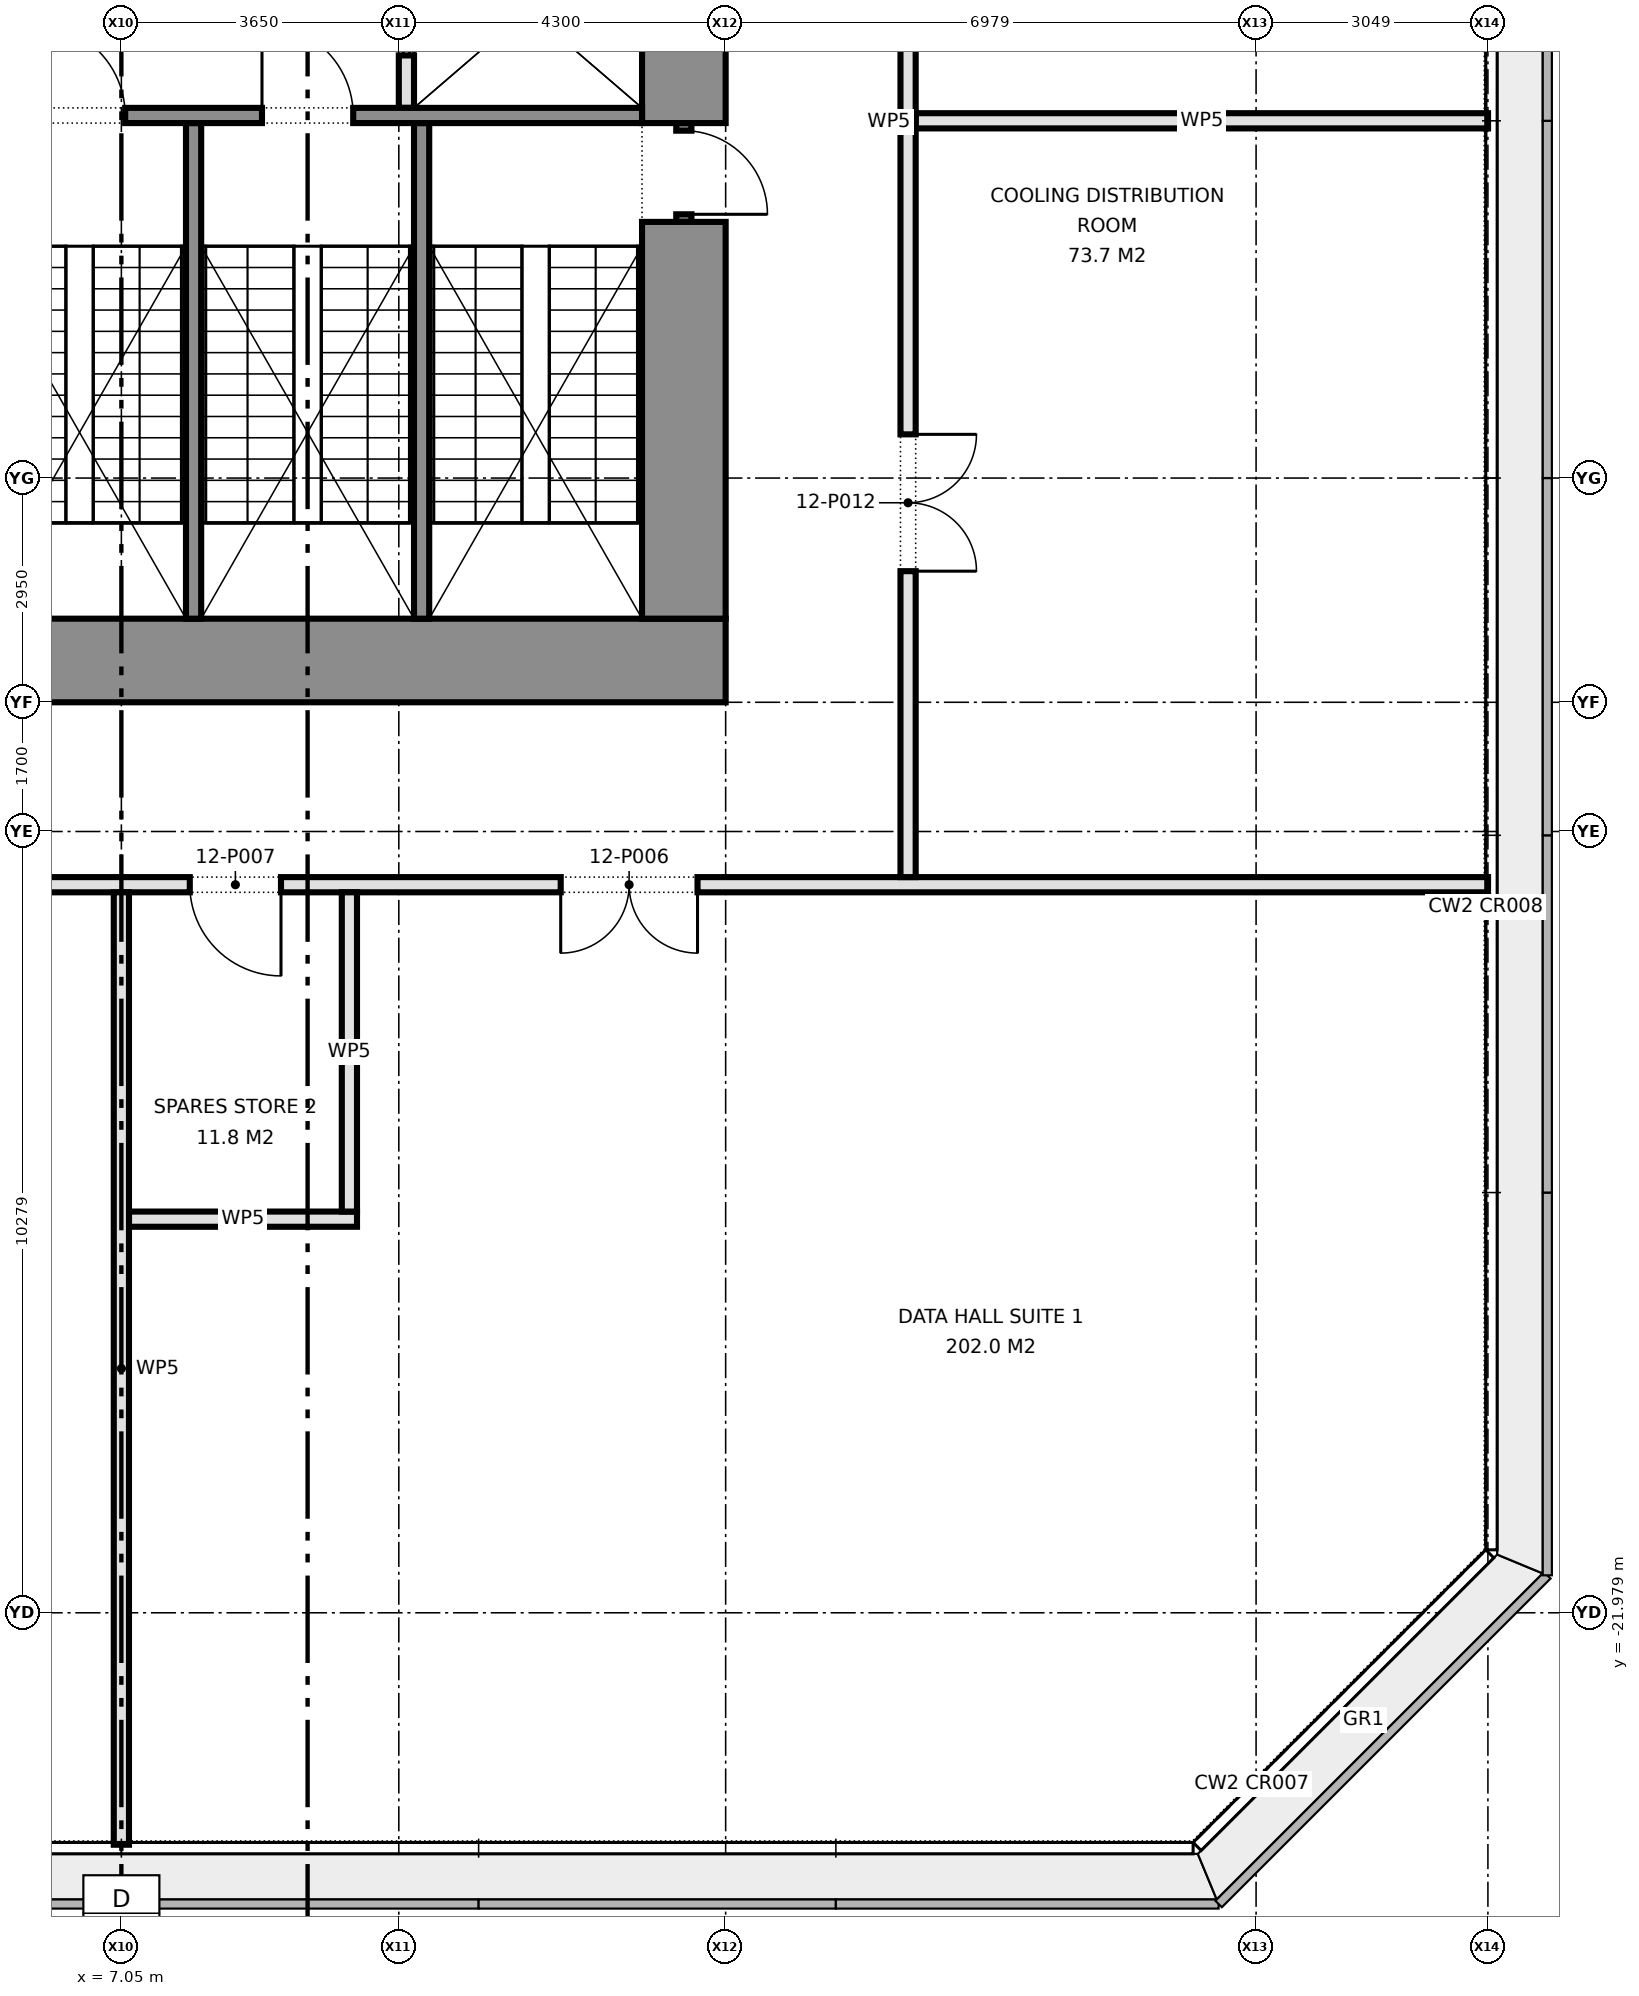
"""IFC4 building model, lengths in metres.
Left out: names, types, materials, properties, quantities, classifications, styles, units other than length and angle.
Written with IfcOpenShell. Run it as: python <this file> out.ifc"""

import sys

from ifc_helpers import new_model, si_unit, direction, frame, frame_2d, origin, place, context, subcontext, project, spatial, rectangle, extrude, element, fill, save


model = new_model("IFC4")
c1 = context("Model", 3, precision=1e-05, world=origin(), true_north=direction((0.0, 1.0)))
c2 = subcontext(c1, "Body", "Model", "MODEL_VIEW")
j1 = project(units=[si_unit("LENGTHUNIT", "METRE"), si_unit("PLANEANGLEUNIT", "RADIAN")], contexts=[c1])
p1 = place(None, origin())
s1 = spatial("IfcSite", under=j1, at=p1, CompositionType="ELEMENT")
p2 = place(p1, origin())
s2 = spatial("IfcBuilding", under=s1, at=p2, CompositionType="ELEMENT")
p3 = place(p2, frame((0.0, 0.0, 54.5)))
s3 = spatial("IfcBuildingStorey", under=s2, at=p3, CompositionType="ELEMENT", Elevation=54.5)
p4 = place(p3, frame((15.0, -9.45, 0.0), z_axis=(0.0, 0.0, 1.0), x_axis=(-1.0, 0.0, 0.0)))
e1 = element("IfcWall", 1, at=p4, inside=s3, PredefinedType="SHEAR", context=c2, shape_type="SweptSolid", body=[
    extrude(rectangle(XDim=11.0, YDim=1.1, at=frame_2d((5.5, 0.0))), origin(), (0.0, 0.0, 1.0), 4.575),
])
p5 = place(p3, frame((14.45, 3.75, 0.0), z_axis=(0.0, 0.0, 1.0), x_axis=(0.0, -1.0, 0.0)))
e2 = element("IfcWall", 2, at=p5, inside=s3, PredefinedType="SHEAR", context=c2, shape_type="SweptSolid", body=[
    extrude(rectangle(XDim=6.13, YDim=1.1, at=frame_2d((3.065, 0.0))), origin(), (0.0, 0.0, 1.0), 4.575),
])
p6 = place(p3, frame((14.45, -2.38, 0.0), z_axis=(0.0, 0.0, 1.0), x_axis=(0.0, -1.0, 0.0)))
e3 = element("IfcWall", 3, at=p6, inside=s3, PredefinedType="SHEAR", context=c2, shape_type="SweptSolid", body=[
    extrude(rectangle(XDim=1.3, YDim=0.2, at=frame_2d((0.65, 0.0))), origin(), (0.0, 0.0, 1.0), 2.4),
])
p7 = place(p6, frame((0.1, 0.0, 0.0)))
e4 = element("IfcOpeningElement", 4, at=p7, cuts=e3, PredefinedType="OPENING", context=c2, shape_type="SweptSolid", body=[
    extrude(rectangle(XDim=1.1, YDim=2.1, at=frame_2d((0.55, 1.05))), frame((0.0, 0.11, 0.0), z_axis=(0.0, -1.0, 0.0), x_axis=(1.0, 0.0, 0.0)), (0.0, 0.0, 1.0), 0.22),
])
p8 = place(p3, frame((14.45, -3.68, 0.0), z_axis=(0.0, 0.0, 1.0), x_axis=(0.0, -1.0, 0.0)))
e5 = element("IfcWall", 5, at=p8, inside=s3, PredefinedType="SHEAR", context=c2, shape_type="SweptSolid", body=[
    extrude(rectangle(XDim=5.22, YDim=1.1, at=frame_2d((2.61, 0.0))), origin(), (0.0, 0.0, 1.0), 4.575),
])
p9 = place(p3, frame((10.8, 0.4, 0.0), z_axis=(0.0, 0.0, 1.0), x_axis=(0.0, -1.0, 0.0)))
e6 = element("IfcWall", 6, at=p9, inside=s3, PredefinedType="PARTITIONING", context=c2, shape_type="SweptSolid", body=[
    extrude(rectangle(XDim=2.58, YDim=0.2, at=frame_2d((1.29, 0.0))), origin(), (0.0, 0.0, 1.0), 4.575),
])
p10 = place(p9, frame((0.69, 0.0, 0.0)))
e7 = element("IfcOpeningElement", 7, at=p10, cuts=e6, PredefinedType="OPENING", context=c2, shape_type="SweptSolid", body=[
    extrude(rectangle(XDim=1.2, YDim=2.1, at=frame_2d((0.6, 1.05))), frame((0.0, 0.11, 0.0), z_axis=(0.0, -1.0, 0.0), x_axis=(1.0, 0.0, 0.0)), (0.0, 0.0, 1.0), 0.22),
])
p11 = place(p3, frame((13.9, -2.28, 0.0), z_axis=(0.0, 0.0, 1.0), x_axis=(-1.0, 0.0, 0.0)))
e8 = element("IfcWall", 8, at=p11, inside=s3, PredefinedType="SHEAR", context=c2, shape_type="SweptSolid", body=[
    extrude(rectangle(XDim=8.8, YDim=0.2, at=frame_2d((4.4, 0.0))), origin(), (0.0, 0.0, 1.0), 4.575),
])
p12 = place(p11, frame((3.8, 0.0, 0.0)))
e9 = element("IfcOpeningElement", 9, at=p12, cuts=e8, PredefinedType="OPENING", context=c2, shape_type="SweptSolid", body=[
    extrude(rectangle(XDim=1.2, YDim=2.1, at=frame_2d((0.6, 1.05))), frame((0.0, 0.11, 0.0), z_axis=(0.0, -1.0, 0.0), x_axis=(1.0, 0.0, 0.0)), (0.0, 0.0, 1.0), 0.22),
])
p13 = place(p11, frame((6.8, 0.0, 0.0)))
e10 = element("IfcOpeningElement", 10, at=p13, cuts=e8, PredefinedType="OPENING", context=c2, shape_type="SweptSolid", body=[
    extrude(rectangle(XDim=1.2, YDim=2.1, at=frame_2d((0.6, 1.05))), frame((0.0, 0.11, 0.0), z_axis=(0.0, -1.0, 0.0), x_axis=(1.0, 0.0, 0.0)), (0.0, 0.0, 1.0), 0.22),
])
for number, where, z_axis, x_axis in (
    (11, (11.0, -2.38, 0.0), (0.0, 0.0, 1.0), (0.0, -1.0, 0.0)),
    (12, (8.0, -2.38, 0.0), (0.0, 0.0, 1.0), (0.0, -1.0, 0.0)),
):
    element("IfcWall", number, at=place(p3, frame(where, z_axis=z_axis, x_axis=x_axis)), inside=s3, PredefinedType="SHEAR", context=c2, shape_type="SweptSolid", body=[
        extrude(rectangle(XDim=6.52, YDim=0.2, at=frame_2d((3.26, 0.0))), origin(), (0.0, 0.0, 1.0), 4.575),
    ])
p14 = place(p3, frame((7.15, -16.8, 0.0), z_axis=(0.0, 0.0, 1.0), x_axis=(1.0, 0.0, 0.0)))
e13 = element("IfcWall", 13, at=p14, inside=s3, PredefinedType="PARTITIONING", context=c2, shape_type="SweptSolid", body=[
    extrude(rectangle(XDim=3.0, YDim=0.2, at=frame_2d((1.5, 0.0))), origin(), (0.0, 0.0, 1.0), 4.575),
])
p15 = place(p3, frame((-25.03, -12.4, 0.0), z_axis=(0.0, 0.0, 1.0), x_axis=(1.0, 0.0, 0.0)))
e14 = element("IfcWall", 14, at=p15, inside=s3, PredefinedType="PARTITIONING", context=c2, shape_type="SweptSolid", body=[
    extrude(rectangle(XDim=50.06, YDim=0.2, at=frame_2d((25.03, 0.0))), origin(), (0.0, 0.0, 1.0), 4.575),
])
p16 = place(p15, frame((18.95, 0.0, 0.0)))
e15 = element("IfcOpeningElement", 15, at=p16, cuts=e14, PredefinedType="OPENING", context=c2, shape_type="SweptSolid", body=[
    extrude(rectangle(XDim=1.8, YDim=2.1, at=frame_2d((0.9, 1.05))), frame((0.0, 0.11, 0.0), z_axis=(0.0, -1.0, 0.0), x_axis=(1.0, 0.0, 0.0)), (0.0, 0.0, 1.0), 0.22),
])
p17 = place(p15, frame((37.86, 0.0, 0.0)))
e16 = element("IfcOpeningElement", 16, at=p17, cuts=e14, PredefinedType="OPENING", context=c2, shape_type="SweptSolid", body=[
    extrude(rectangle(XDim=1.8, YDim=2.1, at=frame_2d((0.9, 1.05))), frame((0.0, 0.11, 0.0), z_axis=(0.0, -1.0, 0.0), x_axis=(1.0, 0.0, 0.0)), (0.0, 0.0, 1.0), 0.22),
])
p18 = place(p15, frame((32.98, 0.0, 0.0)))
e17 = element("IfcOpeningElement", 17, at=p18, cuts=e14, PredefinedType="OPENING", context=c2, shape_type="SweptSolid", body=[
    extrude(rectangle(XDim=1.2, YDim=2.1, at=frame_2d((0.6, 1.05))), frame((0.0, 0.11, 0.0), z_axis=(0.0, -1.0, 0.0), x_axis=(1.0, 0.0, 0.0)), (0.0, 0.0, 1.0), 0.22),
])
p19 = place(p3, frame((17.5, -2.35, 0.0), z_axis=(0.0, 0.0, 1.0), x_axis=(1.0, 0.0, 0.0)))
e18 = element("IfcWall", 18, at=p19, inside=s3, PredefinedType="PARTITIONING", context=c2, shape_type="SweptSolid", body=[
    extrude(rectangle(XDim=7.53, YDim=0.2, at=frame_2d((3.765, 0.0))), origin(), (0.0, 0.0, 1.0), 4.575),
])
p20 = place(p3, frame((17.4, -12.3, 0.0), z_axis=(0.0, 0.0, 1.0), x_axis=(0.0, 1.0, 0.0)))
e19 = element("IfcWall", 19, at=p20, inside=s3, PredefinedType="PARTITIONING", context=c2, shape_type="SweptSolid", body=[
    extrude(rectangle(XDim=24.6, YDim=0.2, at=frame_2d((12.3, 0.0))), origin(), (0.0, 0.0, 1.0), 4.575),
])
p21 = place(p20, frame((4.025, 0.0, 0.0)))
e20 = element("IfcOpeningElement", 20, at=p21, cuts=e19, PredefinedType="OPENING", context=c2, shape_type="SweptSolid", body=[
    extrude(rectangle(XDim=1.8, YDim=2.1, at=frame_2d((0.9, 1.05))), frame((0.0, 0.11, 0.0), z_axis=(0.0, -1.0, 0.0), x_axis=(1.0, 0.0, 0.0)), (0.0, 0.0, 1.0), 0.22),
])
p22 = place(p20, frame((14.05, 0.0, 0.0)))
e21 = element("IfcOpeningElement", 21, at=p22, cuts=e19, PredefinedType="OPENING", context=c2, shape_type="SweptSolid", body=[
    extrude(rectangle(XDim=1.2, YDim=2.1, at=frame_2d((0.6, 1.05))), frame((0.0, 0.11, 0.0), z_axis=(0.0, -1.0, 0.0), x_axis=(1.0, 0.0, 0.0)), (0.0, 0.0, 1.0), 0.22),
])
p23 = place(p20, frame((21.125, 0.0, 0.0)))
e22 = element("IfcOpeningElement", 22, at=p23, cuts=e19, PredefinedType="OPENING", context=c2, shape_type="SweptSolid", body=[
    extrude(rectangle(XDim=1.8, YDim=2.1, at=frame_2d((0.9, 1.05))), frame((0.0, 0.11, 0.0), z_axis=(0.0, -1.0, 0.0), x_axis=(1.0, 0.0, 0.0)), (0.0, 0.0, 1.0), 0.22),
])
p24 = place(p3, frame((10.05, -16.7, 0.0), z_axis=(0.0, 0.0, 1.0), x_axis=(0.0, 1.0, 0.0)))
e23 = element("IfcWall", 23, at=p24, inside=s3, PredefinedType="PARTITIONING", context=c2, shape_type="SweptSolid", body=[
    extrude(rectangle(XDim=4.2, YDim=0.2, at=frame_2d((2.1, 0.0))), origin(), (0.0, 0.0, 1.0), 4.575),
])
p25 = place(p3, frame((7.05, -25.03, 0.0), z_axis=(0.0, 0.0, 1.0), x_axis=(0.0, 1.0, 0.0)))
e24 = element("IfcWall", 24, at=p25, inside=s3, PredefinedType="PARTITIONING", context=c2, shape_type="SweptSolid", body=[
    extrude(rectangle(XDim=12.53, YDim=0.2, at=frame_2d((6.265, 0.0))), origin(), (0.0, 0.0, 1.0), 4.575),
])
p26 = place(p7, origin())
e25 = element("IfcDoor", 25, at=p26, inside=s3, OperationType="SINGLE_SWING_RIGHT", PredefinedType="DOOR", context=c2, shape_type="SweptSolid", body=[
    extrude(rectangle(XDim=1.1, YDim=2.1, at=frame_2d((0.55, 1.05))), frame((0.0, 0.025, 0.0), z_axis=(0.0, -1.0, 0.0), x_axis=(1.0, 0.0, 0.0)), (0.0, 0.0, 1.0), 0.05),
])
fill(e4, e25)
p27 = place(p10, origin())
e26 = element("IfcDoor", 26, at=p27, inside=s3, OperationType="DOUBLE_DOOR_SLIDING", PredefinedType="DOOR", context=c2, shape_type="SweptSolid", body=[
    extrude(rectangle(XDim=1.2, YDim=2.1, at=frame_2d((0.6, 1.05))), frame((0.0, 0.025, 0.0), z_axis=(0.0, -1.0, 0.0), x_axis=(1.0, 0.0, 0.0)), (0.0, 0.0, 1.0), 0.05),
])
fill(e7, e26)
p28 = place(p12, frame((1.2, 0.0, 0.0), z_axis=(0.0, 0.0, 1.0), x_axis=(-1.0, 0.0, 0.0)))
e27 = element("IfcDoor", 27, at=p28, inside=s3, OperationType="SINGLE_SWING_LEFT", PredefinedType="DOOR", context=c2, shape_type="SweptSolid", body=[
    extrude(rectangle(XDim=1.2, YDim=2.1, at=frame_2d((0.6, 1.05))), frame((0.0, 0.025, 0.0), z_axis=(0.0, -1.0, 0.0), x_axis=(1.0, 0.0, 0.0)), (0.0, 0.0, 1.0), 0.05),
])
fill(e9, e27)
p29 = place(p13, frame((1.2, 0.0, 0.0), z_axis=(0.0, 0.0, 1.0), x_axis=(-1.0, 0.0, 0.0)))
e28 = element("IfcDoor", 28, at=p29, inside=s3, OperationType="SINGLE_SWING_LEFT", PredefinedType="DOOR", context=c2, shape_type="SweptSolid", body=[
    extrude(rectangle(XDim=1.2, YDim=2.1, at=frame_2d((0.6, 1.05))), frame((0.0, 0.025, 0.0), z_axis=(0.0, -1.0, 0.0), x_axis=(1.0, 0.0, 0.0)), (0.0, 0.0, 1.0), 0.05),
])
fill(e10, e28)
p30 = place(p17, frame((1.8, 0.0, 0.0), z_axis=(0.0, 0.0, 1.0), x_axis=(-1.0, 0.0, 0.0)))
e29 = element("IfcDoor", 29, at=p30, inside=s3, OperationType="DOUBLE_DOOR_SINGLE_SWING", PredefinedType="DOOR", context=c2, shape_type="SweptSolid", body=[
    extrude(rectangle(XDim=1.8, YDim=2.1, at=frame_2d((0.9, 1.05))), frame((0.0, 0.025, 0.0), z_axis=(0.0, -1.0, 0.0), x_axis=(1.0, 0.0, 0.0)), (0.0, 0.0, 1.0), 0.05),
])
fill(e16, e29)
p31 = place(p18, frame((1.2, 0.0, 0.0), z_axis=(0.0, 0.0, 1.0), x_axis=(-1.0, 0.0, 0.0)))
e30 = element("IfcDoor", 30, at=p31, inside=s3, OperationType="SINGLE_SWING_LEFT", PredefinedType="DOOR", context=c2, shape_type="SweptSolid", body=[
    extrude(rectangle(XDim=1.2, YDim=2.1, at=frame_2d((0.6, 1.05))), frame((0.0, 0.025, 0.0), z_axis=(0.0, -1.0, 0.0), x_axis=(1.0, 0.0, 0.0)), (0.0, 0.0, 1.0), 0.05),
])
fill(e17, e30)
p32 = place(p21, frame((1.8, 0.0, 0.0), z_axis=(0.0, 0.0, 1.0), x_axis=(-1.0, 0.0, 0.0)))
e31 = element("IfcDoor", 31, at=p32, inside=s3, OperationType="DOUBLE_DOOR_SINGLE_SWING", PredefinedType="DOOR", context=c2, shape_type="SweptSolid", body=[
    extrude(rectangle(XDim=1.8, YDim=2.1, at=frame_2d((0.9, 1.05))), frame((0.0, 0.025, 0.0), z_axis=(0.0, -1.0, 0.0), x_axis=(1.0, 0.0, 0.0)), (0.0, 0.0, 1.0), 0.05),
])
fill(e20, e31)
save(model, sys.argv[1])
